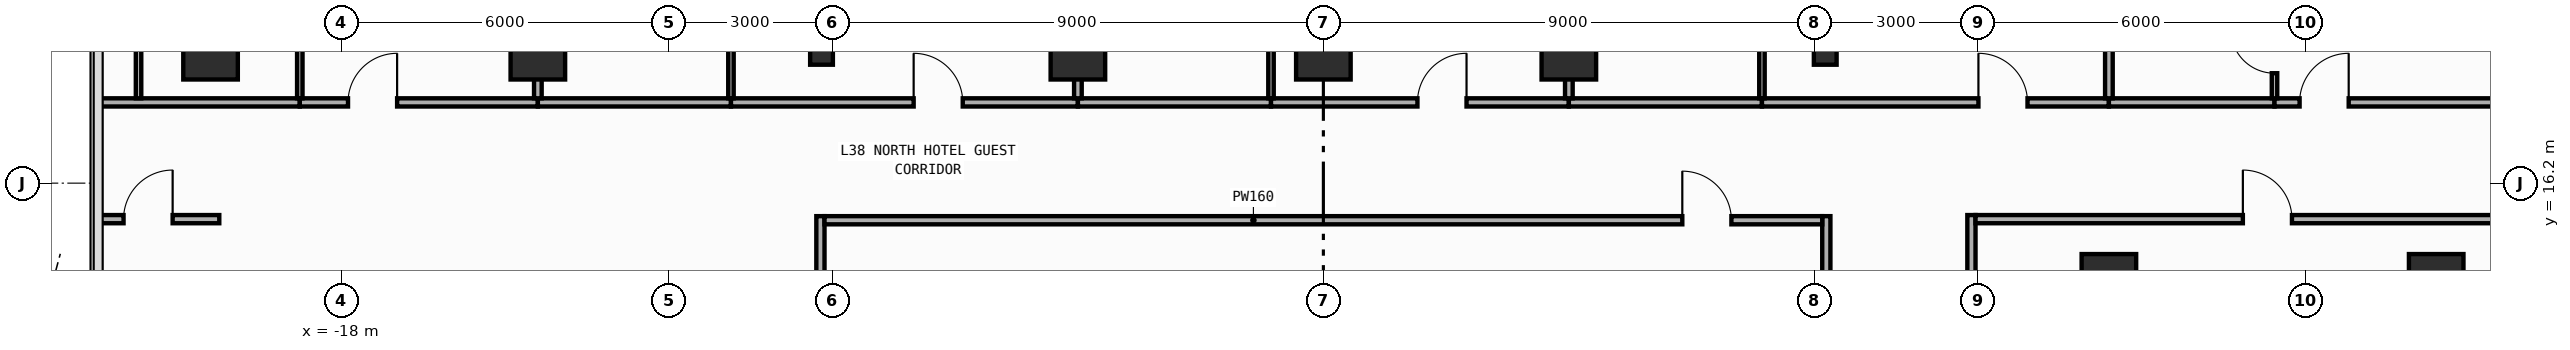
"""IFC4 building model, lengths in metres.
Left out: names, types, materials, properties, quantities, classifications, styles, units other than length and angle.
Written with IfcOpenShell. Run it as: python <this file> out.ifc"""

import sys

from ifc_helpers import new_model, si_unit, direction, frame, frame_2d, origin, origin_2d, place, context, subcontext, project, spatial, rectangle, i_section, extrude, element, fill, save


model = new_model("IFC4")
c1 = context("Model", 3, precision=1e-05, world=origin(), true_north=direction((0.0, 1.0)))
c2 = subcontext(c1, "Body", "Model", "MODEL_VIEW")
j1 = project(units=[si_unit("LENGTHUNIT", "METRE"), si_unit("PLANEANGLEUNIT", "RADIAN")], contexts=[c1])
p1 = place(None, origin())
s1 = spatial("IfcSite", under=j1, at=p1, CompositionType="ELEMENT")
p2 = place(p1, origin())
s2 = spatial("IfcBuilding", under=s1, at=p2, CompositionType="ELEMENT")
p3 = place(p2, frame((0.0, 0.0, 168.8)))
s3 = spatial("IfcBuildingStorey", under=s2, at=p3, CompositionType="ELEMENT", Elevation=168.8)
for number, where, z_axis, x_axis in (
    (1, (-9.2, 18.6, 0.0), (0.0, 0.0, 1.0), (1.0, 0.0, 0.0)),
    (2, (9.2, 18.6, 0.0), (0.0, 0.0, 1.0), (1.0, 0.0, 0.0)),
):
    element("IfcColumn", number, at=place(p3, frame(where, z_axis=z_axis, x_axis=x_axis)), inside=s3, PredefinedType="COLUMN", context=c2, shape_type="SweptSolid", body=[
        extrude(i_section(OverallWidth=0.417, OverallDepth=0.458, WebThickness=0.03, FlangeThickness=0.05, FilletRadius=0.022, at=origin_2d()), origin(), (0.0, 0.0, 1.0), 3.8),
    ])
for number, where, z_axis, x_axis in (
    (3, (-20.4, 18.6, 0.0), (0.0, 0.0, 1.0), (1.0, 0.0, 0.0)),
    (4, (20.4, 14.4, 0.0), (0.0, 0.0, 1.0), (1.0, 0.0, 0.0)),
    (5, (-14.4, 18.6, 0.0), (0.0, 0.0, 1.0), (1.0, 0.0, 0.0)),
    (6, (14.4, 14.4, 0.0), (0.0, 0.0, 1.0), (1.0, 0.0, 0.0)),
    (7, (-4.5, 18.6, 0.0), (0.0, 0.0, 1.0), (1.0, 0.0, 0.0)),
    (8, (0.0, 18.6, 0.0), (0.0, 0.0, 1.0), (1.0, 0.0, 0.0)),
    (9, (4.5, 18.6, 0.0), (0.0, 0.0, 1.0), (1.0, 0.0, 0.0)),
):
    element("IfcColumn", number, at=place(p3, frame(where, z_axis=z_axis, x_axis=x_axis)), inside=s3, PredefinedType="COLUMN", context=c2, shape_type="SweptSolid", body=[
        extrude(rectangle(XDim=1.0, YDim=1.0, at=origin_2d()), origin(), (0.0, 0.0, 1.0), 3.8),
    ])
p4 = place(p3, frame((-9.22, -3.6, 0.0), z_axis=(0.0, 0.0, 1.0), x_axis=(0.0, 1.0, 0.0)))
e10 = element("IfcWall", 10, at=p4, inside=s3, PredefinedType="PARTITIONING", context=c2, shape_type="SweptSolid", body=[
    extrude(rectangle(XDim=19.195, YDim=0.15, at=frame_2d((9.598, 0.0))), origin(), (0.0, 0.0, 1.0), 2.952),
])
p5 = place(p4, frame((8.542, 0.0, 0.0)))
e11 = element("IfcOpeningElement", 11, at=p5, cuts=e10, PredefinedType="OPENING", context=c2, shape_type="SweptSolid", body=[
    extrude(rectangle(XDim=0.9, YDim=2.15, at=frame_2d((0.45, 1.075))), frame((0.0, 0.085, 0.0), z_axis=(0.0, -1.0, 0.0), x_axis=(1.0, 0.0, 0.0)), (0.0, 0.0, 1.0), 0.17),
])
p6 = place(p3, frame((9.22, -3.6, 0.0), z_axis=(0.0, 0.0, 1.0), x_axis=(0.0, 1.0, 0.0)))
e12 = element("IfcWall", 12, at=p6, inside=s3, PredefinedType="PARTITIONING", context=c2, shape_type="SweptSolid", body=[
    extrude(rectangle(XDim=19.195, YDim=0.15, at=frame_2d((9.598, 0.0))), origin(), (0.0, 0.0, 1.0), 2.952),
])
p7 = place(p6, frame((8.542, 0.0, 0.0)))
e13 = element("IfcOpeningElement", 13, at=p7, cuts=e12, PredefinedType="OPENING", context=c2, shape_type="SweptSolid", body=[
    extrude(rectangle(XDim=0.9, YDim=2.15, at=frame_2d((0.45, 1.075))), frame((0.0, 0.085, 0.0), z_axis=(0.0, -1.0, 0.0), x_axis=(1.0, 0.0, 0.0)), (0.0, 0.0, 1.0), 0.17),
])
p8 = place(p3, frame((11.88, 7.16, 0.0), z_axis=(0.0, 0.0, 1.0), x_axis=(0.0, 1.0, 0.0)))
e14 = element("IfcWall", 14, at=p8, inside=s3, PredefinedType="PARTITIONING", context=c2, shape_type="SweptSolid", body=[
    extrude(rectangle(XDim=8.455, YDim=0.15, at=frame_2d((4.228, 0.0))), origin(), (0.0, 0.0, 1.0), 3.54),
])
p9 = place(p8, frame((0.46, 0.0, 0.0)))
e15 = element("IfcOpeningElement", 15, at=p9, cuts=e14, PredefinedType="OPENING", context=c2, shape_type="SweptSolid", body=[
    extrude(rectangle(XDim=0.9, YDim=2.15, at=frame_2d((0.45, 1.075))), frame((0.0, 0.085, 0.0), z_axis=(0.0, -1.0, 0.0), x_axis=(1.0, 0.0, 0.0)), (0.0, 0.0, 1.0), 0.17),
])
p10 = place(p3, frame((-9.145, 15.52, 0.0), z_axis=(0.0, 0.0, 1.0), x_axis=(1.0, 0.0, 0.0)))
e16 = element("IfcWall", 16, at=p10, inside=s3, PredefinedType="PARTITIONING", context=c2, shape_type="SweptSolid", body=[
    extrude(rectangle(XDim=18.29, YDim=0.15, at=frame_2d((9.145, 0.0))), origin(), (0.0, 0.0, 1.0), 3.54),
])
p11 = place(p10, frame((15.725, 0.0, 0.0)))
e17 = element("IfcOpeningElement", 17, at=p11, cuts=e16, PredefinedType="OPENING", context=c2, shape_type="SweptSolid", body=[
    extrude(rectangle(XDim=0.9, YDim=2.15, at=frame_2d((0.45, 1.075))), frame((0.0, 0.085, 0.0), z_axis=(0.0, -1.0, 0.0), x_axis=(1.0, 0.0, 0.0)), (0.0, 0.0, 1.0), 0.17),
])
p12 = place(p3, frame((-22.455, 17.68, 0.0), z_axis=(0.0, 0.0, 1.0), x_axis=(1.0, 0.0, 0.0)))
e18 = element("IfcWall", 18, at=p12, inside=s3, PredefinedType="PARTITIONING", context=c2, shape_type="SweptSolid", body=[
    extrude(rectangle(XDim=3.691, YDim=0.15, at=frame_2d((1.846, 0.0))), origin(), (0.0, 0.0, 1.0), 3.54),
])
p13 = place(p3, frame((-18.764, 17.68, 0.0), z_axis=(0.0, 0.0, 1.0), x_axis=(1.0, 0.0, 0.0)))
e19 = element("IfcWall", 19, at=p13, inside=s3, PredefinedType="PARTITIONING", context=c2, shape_type="SweptSolid", body=[
    extrude(rectangle(XDim=4.364, YDim=0.15, at=frame_2d((2.182, 0.0))), origin(), (0.0, 0.0, 1.0), 3.54),
])
p14 = place(p13, frame((0.884, 0.0, 0.0)))
e20 = element("IfcOpeningElement", 20, at=p14, cuts=e19, PredefinedType="OPENING", context=c2, shape_type="SweptSolid", body=[
    extrude(rectangle(XDim=0.9, YDim=2.15, at=frame_2d((0.45, 1.075))), frame((0.0, 0.085, 0.0), z_axis=(0.0, -1.0, 0.0), x_axis=(1.0, 0.0, 0.0)), (0.0, 0.0, 1.0), 0.17),
])
p15 = place(p3, frame((-14.4, 17.68, 0.0), z_axis=(0.0, 0.0, 1.0), x_axis=(1.0, 0.0, 0.0)))
e21 = element("IfcWall", 21, at=p15, inside=s3, PredefinedType="PARTITIONING", context=c2, shape_type="SweptSolid", body=[
    extrude(rectangle(XDim=3.54, YDim=0.15, at=frame_2d((1.77, 0.0))), origin(), (0.0, 0.0, 1.0), 3.54),
])
p16 = place(p3, frame((-10.86, 17.68, 0.0), z_axis=(0.0, 0.0, 1.0), x_axis=(1.0, 0.0, 0.0)))
e22 = element("IfcWall", 22, at=p16, inside=s3, PredefinedType="PARTITIONING", context=c2, shape_type="SweptSolid", body=[
    extrude(rectangle(XDim=6.36, YDim=0.15, at=frame_2d((3.18, 0.0))), origin(), (0.0, 0.0, 1.0), 3.54),
])
p17 = place(p16, frame((3.349, 0.0, 0.0)))
e23 = element("IfcOpeningElement", 23, at=p17, cuts=e22, PredefinedType="OPENING", context=c2, shape_type="SweptSolid", body=[
    extrude(rectangle(XDim=0.9, YDim=2.15, at=frame_2d((0.45, 1.075))), frame((0.0, 0.085, 0.0), z_axis=(0.0, -1.0, 0.0), x_axis=(1.0, 0.0, 0.0)), (0.0, 0.0, 1.0), 0.17),
])
p18 = place(p3, frame((-4.5, 17.68, 0.0), z_axis=(0.0, 0.0, 1.0), x_axis=(1.0, 0.0, 0.0)))
e24 = element("IfcWall", 24, at=p18, inside=s3, PredefinedType="PARTITIONING", context=c2, shape_type="SweptSolid", body=[
    extrude(rectangle(XDim=3.54, YDim=0.15, at=frame_2d((1.77, 0.0))), origin(), (0.0, 0.0, 1.0), 3.54),
])
p19 = place(p3, frame((-0.96, 17.68, 0.0), z_axis=(0.0, 0.0, 1.0), x_axis=(1.0, 0.0, 0.0)))
e25 = element("IfcWall", 25, at=p19, inside=s3, PredefinedType="PARTITIONING", context=c2, shape_type="SweptSolid", body=[
    extrude(rectangle(XDim=5.46, YDim=0.15, at=frame_2d((2.73, 0.0))), origin(), (0.0, 0.0, 1.0), 3.54),
])
p20 = place(p19, frame((2.684, 0.0, 0.0)))
e26 = element("IfcOpeningElement", 26, at=p20, cuts=e25, PredefinedType="OPENING", context=c2, shape_type="SweptSolid", body=[
    extrude(rectangle(XDim=0.9, YDim=2.15, at=frame_2d((0.45, 1.075))), frame((0.0, 0.085, 0.0), z_axis=(0.0, -1.0, 0.0), x_axis=(1.0, 0.0, 0.0)), (0.0, 0.0, 1.0), 0.17),
])
p21 = place(p3, frame((4.5, 17.68, 0.0), z_axis=(0.0, 0.0, 1.0), x_axis=(1.0, 0.0, 0.0)))
e27 = element("IfcWall", 27, at=p21, inside=s3, PredefinedType="PARTITIONING", context=c2, shape_type="SweptSolid", body=[
    extrude(rectangle(XDim=3.54, YDim=0.15, at=frame_2d((1.77, 0.0))), origin(), (0.0, 0.0, 1.0), 3.54),
])
p22 = place(p3, frame((8.04, 17.68, 0.0), z_axis=(0.0, 0.0, 1.0), x_axis=(1.0, 0.0, 0.0)))
e28 = element("IfcWall", 28, at=p22, inside=s3, PredefinedType="PARTITIONING", context=c2, shape_type="SweptSolid", body=[
    extrude(rectangle(XDim=6.36, YDim=0.15, at=frame_2d((3.18, 0.0))), origin(), (0.0, 0.0, 1.0), 3.54),
])
p23 = place(p22, frame((3.968, 0.0, 0.0)))
e29 = element("IfcOpeningElement", 29, at=p23, cuts=e28, PredefinedType="OPENING", context=c2, shape_type="SweptSolid", body=[
    extrude(rectangle(XDim=0.9, YDim=2.15, at=frame_2d((0.45, 1.075))), frame((0.0, 0.085, 0.0), z_axis=(0.0, -1.0, 0.0), x_axis=(1.0, 0.0, 0.0)), (0.0, 0.0, 1.0), 0.17),
])
p24 = place(p3, frame((14.4, 17.68, 0.0), z_axis=(0.0, 0.0, 1.0), x_axis=(1.0, 0.0, 0.0)))
e30 = element("IfcWall", 30, at=p24, inside=s3, PredefinedType="PARTITIONING", context=c2, shape_type="SweptSolid", body=[
    extrude(rectangle(XDim=3.036, YDim=0.15, at=frame_2d((1.518, 0.0))), origin(), (0.0, 0.0, 1.0), 3.54),
])
p25 = place(p3, frame((17.436, 17.68, 0.0), z_axis=(0.0, 0.0, 1.0), x_axis=(1.0, 0.0, 0.0)))
e31 = element("IfcWall", 31, at=p25, inside=s3, PredefinedType="PARTITIONING", context=c2, shape_type="SweptSolid", body=[
    extrude(rectangle(XDim=5.019, YDim=0.15, at=frame_2d((2.51, 0.0))), origin(), (0.0, 0.0, 1.0), 3.54),
])
p26 = place(p25, frame((0.46, 0.0, 0.0)))
e32 = element("IfcOpeningElement", 32, at=p26, cuts=e31, PredefinedType="OPENING", context=c2, shape_type="SweptSolid", body=[
    extrude(rectangle(XDim=0.9, YDim=2.15, at=frame_2d((0.45, 1.075))), frame((0.0, 0.085, 0.0), z_axis=(0.0, -1.0, 0.0), x_axis=(1.0, 0.0, 0.0)), (0.0, 0.0, 1.0), 0.17),
])
p27 = place(p3, frame((11.955, 15.54, 0.0), z_axis=(0.0, 0.0, 1.0), x_axis=(1.0, 0.0, 0.0)))
e33 = element("IfcWall", 33, at=p27, inside=s3, PredefinedType="PARTITIONING", context=c2, shape_type="SweptSolid", body=[
    extrude(rectangle(XDim=10.5, YDim=0.15, at=frame_2d((5.25, 0.0))), origin(), (0.0, 0.0, 1.0), 3.54),
])
p28 = place(p27, frame((4.901, 0.0, 0.0)))
e34 = element("IfcOpeningElement", 34, at=p28, cuts=e33, PredefinedType="OPENING", context=c2, shape_type="SweptSolid", body=[
    extrude(rectangle(XDim=0.9, YDim=2.15, at=frame_2d((0.45, 1.075))), frame((0.0, 0.085, 0.0), z_axis=(0.0, -1.0, 0.0), x_axis=(1.0, 0.0, 0.0)), (0.0, 0.0, 1.0), 0.17),
])
p29 = place(p3, frame((-22.455, 15.54, 0.0), z_axis=(0.0, 0.0, 1.0), x_axis=(1.0, 0.0, 0.0)))
e35 = element("IfcWall", 35, at=p29, inside=s3, PredefinedType="PARTITIONING", context=c2, shape_type="SweptSolid", body=[
    extrude(rectangle(XDim=2.215, YDim=0.15, at=frame_2d((1.107, 0.0))), origin(), (0.0, 0.0, 1.0), 3.54),
])
p30 = place(p29, frame((0.46, 0.0, 0.0)))
e36 = element("IfcOpeningElement", 36, at=p30, cuts=e35, PredefinedType="OPENING", context=c2, shape_type="SweptSolid", body=[
    extrude(rectangle(XDim=0.9, YDim=2.15, at=frame_2d((0.45, 1.075))), frame((0.0, 0.085, 0.0), z_axis=(0.0, -1.0, 0.0), x_axis=(1.0, 0.0, 0.0)), (0.0, 0.0, 1.0), 0.17),
])
p31 = place(p3, frame((-18.764, 17.755, 0.0), z_axis=(0.0, 0.0, 1.0), x_axis=(0.0, 1.0, 0.0)))
e37 = element("IfcWall", 37, at=p31, inside=s3, PredefinedType="PARTITIONING", context=c2, shape_type="SweptSolid", body=[
    extrude(rectangle(XDim=2.965, YDim=0.1, at=frame_2d((1.482, 0.0))), origin(), (0.0, 0.0, 1.0), 3.54),
])
p32 = place(p31, frame((1.705, 0.0, 0.0)))
e38 = element("IfcOpeningElement", 38, at=p32, cuts=e37, PredefinedType="OPENING", context=c2, shape_type="SweptSolid", body=[
    extrude(rectangle(XDim=0.8, YDim=2.1, at=frame_2d((0.4, 1.05))), frame((0.0, 0.06, 0.0), z_axis=(0.0, -1.0, 0.0), x_axis=(1.0, 0.0, 0.0)), (0.0, 0.0, 1.0), 0.12),
])
p33 = place(p3, frame((-14.4, 17.755, 0.0), z_axis=(0.0, 0.0, 1.0), x_axis=(0.0, 1.0, 0.0)))
e39 = element("IfcWall", 39, at=p33, inside=s3, PredefinedType="PARTITIONING", context=c2, shape_type="SweptSolid", body=[
    extrude(rectangle(XDim=3.015, YDim=0.14, at=frame_2d((1.508, 0.0))), origin(), (0.0, 0.0, 1.0), 2.952),
])
p34 = place(p3, frame((-10.86, 17.755, 0.0), z_axis=(0.0, 0.0, 1.0), x_axis=(0.0, 1.0, 0.0)))
e40 = element("IfcWall", 40, at=p34, inside=s3, PredefinedType="PARTITIONING", context=c2, shape_type="SweptSolid", body=[
    extrude(rectangle(XDim=2.965, YDim=0.1, at=frame_2d((1.482, 0.0))), origin(), (0.0, 0.0, 1.0), 3.54),
])
p35 = place(p34, frame((1.705, 0.0, 0.0)))
e41 = element("IfcOpeningElement", 41, at=p35, cuts=e40, PredefinedType="OPENING", context=c2, shape_type="SweptSolid", body=[
    extrude(rectangle(XDim=0.8, YDim=2.1, at=frame_2d((0.4, 1.05))), frame((0.0, 0.06, 0.0), z_axis=(0.0, -1.0, 0.0), x_axis=(1.0, 0.0, 0.0)), (0.0, 0.0, 1.0), 0.12),
])
p36 = place(p3, frame((-4.5, 17.755, 0.0), z_axis=(0.0, 0.0, 1.0), x_axis=(0.0, 1.0, 0.0)))
e42 = element("IfcWall", 42, at=p36, inside=s3, PredefinedType="PARTITIONING", context=c2, shape_type="SweptSolid", body=[
    extrude(rectangle(XDim=3.015, YDim=0.14, at=frame_2d((1.508, 0.0))), origin(), (0.0, 0.0, 1.0), 3.54),
])
p37 = place(p3, frame((-0.96, 17.755, 0.0), z_axis=(0.0, 0.0, 1.0), x_axis=(0.0, 1.0, 0.0)))
e43 = element("IfcWall", 43, at=p37, inside=s3, PredefinedType="PARTITIONING", context=c2, shape_type="SweptSolid", body=[
    extrude(rectangle(XDim=2.965, YDim=0.1, at=frame_2d((1.482, 0.0))), origin(), (0.0, 0.0, 1.0), 3.54),
])
p38 = place(p37, frame((1.705, 0.0, 0.0)))
e44 = element("IfcOpeningElement", 44, at=p38, cuts=e43, PredefinedType="OPENING", context=c2, shape_type="SweptSolid", body=[
    extrude(rectangle(XDim=0.8, YDim=2.1, at=frame_2d((0.4, 1.05))), frame((0.0, 0.06, 0.0), z_axis=(0.0, -1.0, 0.0), x_axis=(1.0, 0.0, 0.0)), (0.0, 0.0, 1.0), 0.12),
])
p39 = place(p3, frame((4.5, 17.755, 0.0), z_axis=(0.0, 0.0, 1.0), x_axis=(0.0, 1.0, 0.0)))
e45 = element("IfcWall", 45, at=p39, inside=s3, PredefinedType="PARTITIONING", context=c2, shape_type="SweptSolid", body=[
    extrude(rectangle(XDim=3.015, YDim=0.14, at=frame_2d((1.508, 0.0))), origin(), (0.0, 0.0, 1.0), 3.54),
])
p40 = place(p3, frame((8.04, 17.755, 0.0), z_axis=(0.0, 0.0, 1.0), x_axis=(0.0, 1.0, 0.0)))
e46 = element("IfcWall", 46, at=p40, inside=s3, PredefinedType="PARTITIONING", context=c2, shape_type="SweptSolid", body=[
    extrude(rectangle(XDim=2.965, YDim=0.1, at=frame_2d((1.482, 0.0))), origin(), (0.0, 0.0, 1.0), 3.54),
])
p41 = place(p40, frame((1.705, 0.0, 0.0)))
e47 = element("IfcOpeningElement", 47, at=p41, cuts=e46, PredefinedType="OPENING", context=c2, shape_type="SweptSolid", body=[
    extrude(rectangle(XDim=0.8, YDim=2.1, at=frame_2d((0.4, 1.05))), frame((0.0, 0.06, 0.0), z_axis=(0.0, -1.0, 0.0), x_axis=(1.0, 0.0, 0.0)), (0.0, 0.0, 1.0), 0.12),
])
p42 = place(p3, frame((14.4, 17.755, 0.0), z_axis=(0.0, 0.0, 1.0), x_axis=(0.0, 1.0, 0.0)))
e48 = element("IfcWall", 48, at=p42, inside=s3, PredefinedType="PARTITIONING", context=c2, shape_type="SweptSolid", body=[
    extrude(rectangle(XDim=3.015, YDim=0.14, at=frame_2d((1.508, 0.0))), origin(), (0.0, 0.0, 1.0), 2.952),
])
p43 = place(p3, frame((17.436, 17.755, 0.0), z_axis=(0.0, 0.0, 1.0), x_axis=(0.0, 1.0, 0.0)))
e49 = element("IfcWall", 49, at=p43, inside=s3, PredefinedType="PARTITIONING", context=c2, shape_type="SweptSolid", body=[
    extrude(rectangle(XDim=2.965, YDim=0.1, at=frame_2d((1.482, 0.0))), origin(), (0.0, 0.0, 1.0), 3.54),
])
p44 = place(p43, frame((0.46, 0.0, 0.0)))
e50 = element("IfcOpeningElement", 50, at=p44, cuts=e49, PredefinedType="OPENING", context=c2, shape_type="SweptSolid", body=[
    extrude(rectangle(XDim=0.8, YDim=2.1, at=frame_2d((0.4, 1.05))), frame((0.0, 0.06, 0.0), z_axis=(0.0, -1.0, 0.0), x_axis=(1.0, 0.0, 0.0)), (0.0, 0.0, 1.0), 0.12),
])
p45 = place(p3, frame((-21.72, 17.755, 0.0), z_axis=(0.0, 0.0, 1.0), x_axis=(0.0, 1.0, 0.0)))
e51 = element("IfcWall", 51, at=p45, inside=s3, PredefinedType="PARTITIONING", context=c2, shape_type="SweptSolid", body=[
    extrude(rectangle(XDim=2.965, YDim=0.1, at=frame_2d((1.482, 0.0))), origin(), (0.0, 0.0, 1.0), 3.54),
])
p46 = place(p11, origin())
e52 = element("IfcDoor", 52, at=p46, inside=s3, OperationType="SINGLE_SWING_LEFT", PredefinedType="DOOR", context=c2, shape_type="SweptSolid", body=[
    extrude(rectangle(XDim=0.9, YDim=2.15, at=frame_2d((0.45, 1.075))), frame((0.0, 0.025, 0.0), z_axis=(0.0, -1.0, 0.0), x_axis=(1.0, 0.0, 0.0)), (0.0, 0.0, 1.0), 0.05),
])
fill(e17, e52)
p47 = place(p14, origin())
e53 = element("IfcDoor", 53, at=p47, inside=s3, OperationType="SINGLE_SWING_RIGHT", PredefinedType="DOOR", context=c2, shape_type="SweptSolid", body=[
    extrude(rectangle(XDim=0.9, YDim=2.15, at=frame_2d((0.45, 1.075))), frame((0.0, 0.025, 0.0), z_axis=(0.0, -1.0, 0.0), x_axis=(1.0, 0.0, 0.0)), (0.0, 0.0, 1.0), 0.05),
])
fill(e20, e53)
p48 = place(p17, origin())
e54 = element("IfcDoor", 54, at=p48, inside=s3, OperationType="SINGLE_SWING_LEFT", PredefinedType="DOOR", context=c2, shape_type="SweptSolid", body=[
    extrude(rectangle(XDim=0.9, YDim=2.15, at=frame_2d((0.45, 1.075))), frame((0.0, 0.025, 0.0), z_axis=(0.0, -1.0, 0.0), x_axis=(1.0, 0.0, 0.0)), (0.0, 0.0, 1.0), 0.05),
])
fill(e23, e54)
p49 = place(p20, origin())
e55 = element("IfcDoor", 55, at=p49, inside=s3, OperationType="SINGLE_SWING_RIGHT", PredefinedType="DOOR", context=c2, shape_type="SweptSolid", body=[
    extrude(rectangle(XDim=0.9, YDim=2.15, at=frame_2d((0.45, 1.075))), frame((0.0, 0.025, 0.0), z_axis=(0.0, -1.0, 0.0), x_axis=(1.0, 0.0, 0.0)), (0.0, 0.0, 1.0), 0.05),
])
fill(e26, e55)
p50 = place(p23, origin())
e56 = element("IfcDoor", 56, at=p50, inside=s3, OperationType="SINGLE_SWING_LEFT", PredefinedType="DOOR", context=c2, shape_type="SweptSolid", body=[
    extrude(rectangle(XDim=0.9, YDim=2.15, at=frame_2d((0.45, 1.075))), frame((0.0, 0.025, 0.0), z_axis=(0.0, -1.0, 0.0), x_axis=(1.0, 0.0, 0.0)), (0.0, 0.0, 1.0), 0.05),
])
fill(e29, e56)
p51 = place(p26, origin())
e57 = element("IfcDoor", 57, at=p51, inside=s3, OperationType="SINGLE_SWING_RIGHT", PredefinedType="DOOR", context=c2, shape_type="SweptSolid", body=[
    extrude(rectangle(XDim=0.9, YDim=2.15, at=frame_2d((0.45, 1.075))), frame((0.0, 0.025, 0.0), z_axis=(0.0, -1.0, 0.0), x_axis=(1.0, 0.0, 0.0)), (0.0, 0.0, 1.0), 0.05),
])
fill(e32, e57)
p52 = place(p28, origin())
e58 = element("IfcDoor", 58, at=p52, inside=s3, OperationType="SINGLE_SWING_LEFT", PredefinedType="DOOR", context=c2, shape_type="SweptSolid", body=[
    extrude(rectangle(XDim=0.9, YDim=2.15, at=frame_2d((0.45, 1.075))), frame((0.0, 0.025, 0.0), z_axis=(0.0, -1.0, 0.0), x_axis=(1.0, 0.0, 0.0)), (0.0, 0.0, 1.0), 0.05),
])
fill(e34, e58)
p53 = place(p30, origin())
e59 = element("IfcDoor", 59, at=p53, inside=s3, OperationType="SINGLE_SWING_RIGHT", PredefinedType="DOOR", context=c2, shape_type="SweptSolid", body=[
    extrude(rectangle(XDim=0.9, YDim=2.15, at=frame_2d((0.45, 1.075))), frame((0.0, 0.025, 0.0), z_axis=(0.0, -1.0, 0.0), x_axis=(1.0, 0.0, 0.0)), (0.0, 0.0, 1.0), 0.05),
])
fill(e36, e59)
p54 = place(p44, origin())
e60 = element("IfcDoor", 60, at=p54, inside=s3, OperationType="SINGLE_SWING_RIGHT", PredefinedType="DOOR", context=c2, shape_type="SweptSolid", body=[
    extrude(rectangle(XDim=0.8, YDim=2.1, at=frame_2d((0.4, 1.05))), frame((0.0, 0.025, 0.0), z_axis=(0.0, -1.0, 0.0), x_axis=(1.0, 0.0, 0.0)), (0.0, 0.0, 1.0), 0.05),
])
fill(e50, e60)
save(model, sys.argv[1])
